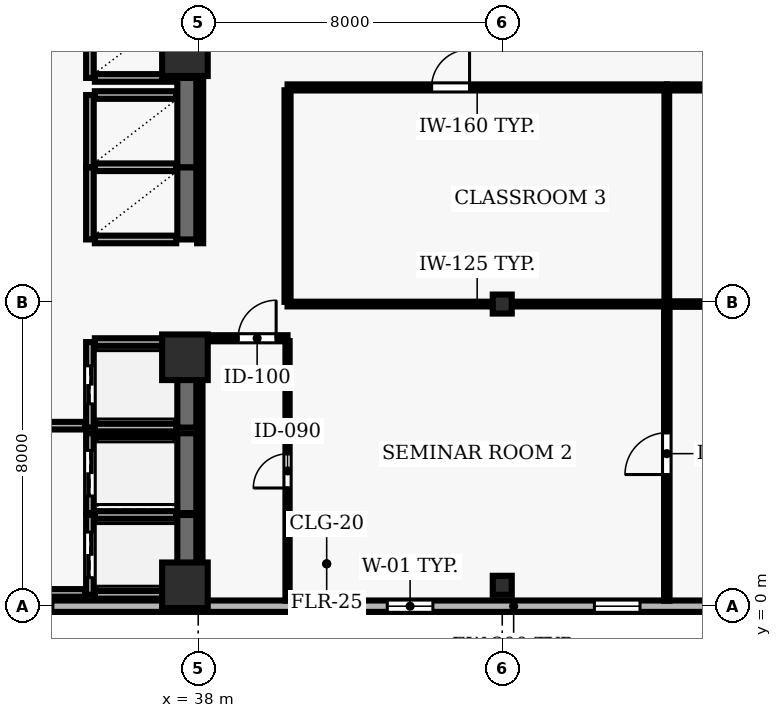
"""IFC4 building model, lengths in metres.
Left out: names, types, materials, properties, quantities, classifications, styles, units other than length and angle.
Written with IfcOpenShell. Run it as: python <this file> out.ifc"""

import sys

from ifc_helpers import new_model, si_unit, direction, frame, frame_2d, origin, origin_2d, place, context, subcontext, project, spatial, rectangle, hollow_rectangle, extrude, element, fill, save


model = new_model("IFC4")
c1 = context("Model", 3, precision=1e-05, world=origin(), true_north=direction((0.0, 1.0)))
c2 = subcontext(c1, "Body", "Model", "MODEL_VIEW")
j1 = project(units=[si_unit("LENGTHUNIT", "METRE"), si_unit("PLANEANGLEUNIT", "RADIAN")], contexts=[c1])
p1 = place(None, origin())
s1 = spatial("IfcSite", under=j1, at=p1, CompositionType="ELEMENT")
p2 = place(p1, origin())
s2 = spatial("IfcBuilding", under=s1, at=p2, CompositionType="ELEMENT")
p3 = place(p2, frame((0.0, 0.0, 103.4)))
s3 = spatial("IfcBuildingStorey", under=s2, at=p3, CompositionType="ELEMENT", Elevation=103.4)
for number, where, z_axis, x_axis in (
    (1, (37.65, 0.55, 0.0), (0.0, 0.0, 1.0), (1.0, 0.0, 0.0)),
    (2, (37.65, 6.55, 0.0), (0.0, 0.0, 1.0), (1.0, 0.0, 0.0)),
    (3, (37.65, 14.55, 0.0), (0.0, 0.0, 1.0), (1.0, 0.0, 0.0)),
):
    element("IfcColumn", number, at=place(p3, frame(where, z_axis=z_axis, x_axis=x_axis)), inside=s3, PredefinedType="COLUMN", context=c2, shape_type="SweptSolid", body=[
        extrude(rectangle(XDim=1.2, YDim=1.2, at=origin_2d()), origin(), (0.0, 0.0, 1.0), 3.9),
    ])
for number, where, z_axis, x_axis in (
    (4, (46.0, 0.55, 0.0), (0.0, 0.0, 1.0), (1.0, 0.0, 0.0)),
    (5, (46.0, 7.95, 0.0), (0.0, 0.0, 1.0), (1.0, 0.0, 0.0)),
):
    element("IfcColumn", number, at=place(p3, frame(where, z_axis=z_axis, x_axis=x_axis)), inside=s3, PredefinedType="COLUMN", context=c2, shape_type="SweptSolid", body=[
        extrude(hollow_rectangle(XDim=0.5, YDim=0.5, WallThickness=0.025, at=origin_2d()), origin(), (0.0, 0.0, 1.0), 3.9),
    ])
p4 = place(p3, frame((24.5, 0.0, 0.0), z_axis=(0.0, 0.0, 1.0), x_axis=(1.0, 0.0, 0.0)))
e6 = element("IfcWall", 6, at=p4, inside=s3, PredefinedType="SOLIDWALL", context=c2, shape_type="SweptSolid", body=[
    extrude(rectangle(XDim=43.6, YDim=0.3, at=frame_2d((21.8, 0.0))), origin(), (0.0, 0.0, 1.0), 3.69),
])
p5 = place(p4, frame((2.125, 0.0, 0.9)))
e7 = element("IfcOpeningElement", 7, at=p5, cuts=e6, PredefinedType="OPENING", context=c2, shape_type="SweptSolid", body=[
    extrude(rectangle(XDim=1.2, YDim=1.6, at=frame_2d((0.6, 0.8))), frame((0.0, 0.16, 0.0), z_axis=(0.0, -1.0, 0.0), x_axis=(1.0, 0.0, 0.0)), (0.0, 0.0, 1.0), 0.32),
])
p6 = place(p4, frame((8.475, 0.0, 0.9)))
e8 = element("IfcOpeningElement", 8, at=p6, cuts=e6, PredefinedType="OPENING", context=c2, shape_type="SweptSolid", body=[
    extrude(rectangle(XDim=1.2, YDim=1.6, at=frame_2d((0.6, 0.8))), frame((0.0, 0.16, 0.0), z_axis=(0.0, -1.0, 0.0), x_axis=(1.0, 0.0, 0.0)), (0.0, 0.0, 1.0), 0.32),
])
p7 = place(p4, frame((18.475, 0.0, 0.9)))
e9 = element("IfcOpeningElement", 9, at=p7, cuts=e6, PredefinedType="OPENING", context=c2, shape_type="SweptSolid", body=[
    extrude(rectangle(XDim=1.2, YDim=1.6, at=frame_2d((0.6, 0.8))), frame((0.0, 0.16, 0.0), z_axis=(0.0, -1.0, 0.0), x_axis=(1.0, 0.0, 0.0)), (0.0, 0.0, 1.0), 0.32),
])
p8 = place(p4, frame((23.925, 0.0, 0.9)))
e10 = element("IfcOpeningElement", 10, at=p8, cuts=e6, PredefinedType="OPENING", context=c2, shape_type="SweptSolid", body=[
    extrude(rectangle(XDim=1.2, YDim=1.6, at=frame_2d((0.6, 0.8))), frame((0.0, 0.16, 0.0), z_axis=(0.0, -1.0, 0.0), x_axis=(1.0, 0.0, 0.0)), (0.0, 0.0, 1.0), 0.32),
])
p9 = place(p4, frame((29.375, 0.0, 0.9)))
e11 = element("IfcOpeningElement", 11, at=p9, cuts=e6, PredefinedType="OPENING", context=c2, shape_type="SweptSolid", body=[
    extrude(rectangle(XDim=1.2, YDim=1.6, at=frame_2d((0.6, 0.8))), frame((0.0, 0.16, 0.0), z_axis=(0.0, -1.0, 0.0), x_axis=(1.0, 0.0, 0.0)), (0.0, 0.0, 1.0), 0.32),
])
p10 = place(p4, frame((33.925, 0.0, 0.9)))
e12 = element("IfcOpeningElement", 12, at=p10, cuts=e6, PredefinedType="OPENING", context=c2, shape_type="SweptSolid", body=[
    extrude(rectangle(XDim=1.2, YDim=1.6, at=frame_2d((0.6, 0.8))), frame((0.0, 0.16, 0.0), z_axis=(0.0, -1.0, 0.0), x_axis=(1.0, 0.0, 0.0)), (0.0, 0.0, 1.0), 0.32),
])
p11 = place(p4, frame((40.275, 0.0, 0.9)))
e13 = element("IfcOpeningElement", 13, at=p11, cuts=e6, PredefinedType="OPENING", context=c2, shape_type="SweptSolid", body=[
    extrude(rectangle(XDim=1.2, YDim=1.6, at=frame_2d((0.6, 0.8))), frame((0.0, 0.16, 0.0), z_axis=(0.0, -1.0, 0.0), x_axis=(1.0, 0.0, 0.0)), (0.0, 0.0, 1.0), 0.32),
])
p12 = place(p3, frame((35.15, 2.4, 0.0), z_axis=(0.0, 0.0, 1.0), x_axis=(0.0, -1.0, 0.0)))
e14 = element("IfcWall", 14, at=p12, inside=s3, PredefinedType="SOLIDWALL", context=c2, shape_type="SweptSolid", body=[
    extrude(rectangle(XDim=2.1, YDim=0.2, at=frame_2d((1.05, 0.0))), origin(), (0.0, 0.0, 1.0), 3.69),
])
p13 = place(p12, frame((0.45, 0.0, 0.0)))
e15 = element("IfcOpeningElement", 15, at=p13, cuts=e14, PredefinedType="OPENING", context=c2, shape_type="SweptSolid", body=[
    extrude(rectangle(XDim=1.2, YDim=2.15, at=frame_2d((0.6, 1.075))), frame((0.0, 0.11, 0.0), z_axis=(0.0, -1.0, 0.0), x_axis=(1.0, 0.0, 0.0)), (0.0, 0.0, 1.0), 0.22),
])
p14 = place(p3, frame((37.7, 0.3, 0.0), z_axis=(0.0, 0.0, 1.0), x_axis=(0.0, 1.0, 0.0)))
e16 = element("IfcWall", 16, at=p14, inside=s3, PredefinedType="SHEAR", context=c2, shape_type="SweptSolid", body=[
    extrude(rectangle(XDim=2.1, YDim=0.5, at=frame_2d((1.05, 0.0))), origin(), (0.0, 0.0, 1.0), 3.69),
])
for number, where, z_axis, x_axis in (
    (17, (35.28, 0.3, 0.0), (0.0, 0.0, 1.0), (1.0, 0.0, 0.0)),
    (18, (37.42, 2.4, 0.0), (0.0, 0.0, 1.0), (-1.0, 0.0, 0.0)),
):
    element("IfcWall", number, at=place(p3, frame(where, z_axis=z_axis, x_axis=x_axis)), inside=s3, PredefinedType="SOLIDWALL", context=c2, shape_type="SweptSolid", body=[
        extrude(rectangle(XDim=2.14, YDim=0.2, at=frame_2d((1.07, 0.0))), origin(), (0.0, 0.0, 1.0), 3.69),
    ])
p15 = place(p3, frame((35.15, 4.55, 0.0), z_axis=(0.0, 0.0, 1.0), x_axis=(0.0, -1.0, 0.0)))
e19 = element("IfcWall", 19, at=p15, inside=s3, PredefinedType="SOLIDWALL", context=c2, shape_type="SweptSolid", body=[
    extrude(rectangle(XDim=2.1, YDim=0.2, at=frame_2d((1.05, 0.0))), origin(), (0.0, 0.0, 1.0), 3.69),
])
p16 = place(p15, frame((0.45, 0.0, 0.0)))
e20 = element("IfcOpeningElement", 20, at=p16, cuts=e19, PredefinedType="OPENING", context=c2, shape_type="SweptSolid", body=[
    extrude(rectangle(XDim=1.2, YDim=2.15, at=frame_2d((0.6, 1.075))), frame((0.0, 0.11, 0.0), z_axis=(0.0, -1.0, 0.0), x_axis=(1.0, 0.0, 0.0)), (0.0, 0.0, 1.0), 0.22),
])
p17 = place(p3, frame((37.7, 2.45, 0.0), z_axis=(0.0, 0.0, 1.0), x_axis=(0.0, 1.0, 0.0)))
e21 = element("IfcWall", 21, at=p17, inside=s3, PredefinedType="SHEAR", context=c2, shape_type="SweptSolid", body=[
    extrude(rectangle(XDim=2.1, YDim=0.5, at=frame_2d((1.05, 0.0))), origin(), (0.0, 0.0, 1.0), 3.69),
])
p18 = place(p3, frame((37.42, 4.55, 0.0), z_axis=(0.0, 0.0, 1.0), x_axis=(-1.0, 0.0, 0.0)))
e22 = element("IfcWall", 22, at=p18, inside=s3, PredefinedType="SOLIDWALL", context=c2, shape_type="SweptSolid", body=[
    extrude(rectangle(XDim=2.14, YDim=0.2, at=frame_2d((1.07, 0.0))), origin(), (0.0, 0.0, 1.0), 3.69),
])
p19 = place(p3, frame((35.15, 6.95, 0.0), z_axis=(0.0, 0.0, 1.0), x_axis=(0.0, -1.0, 0.0)))
e23 = element("IfcWall", 23, at=p19, inside=s3, PredefinedType="SOLIDWALL", context=c2, shape_type="SweptSolid", body=[
    extrude(rectangle(XDim=2.25, YDim=0.2, at=frame_2d((1.125, 0.0))), origin(), (0.0, 0.0, 1.0), 3.69),
])
p20 = place(p19, frame((0.625, 0.0, 0.0)))
e24 = element("IfcOpeningElement", 24, at=p20, cuts=e23, PredefinedType="OPENING", context=c2, shape_type="SweptSolid", body=[
    extrude(rectangle(XDim=1.0, YDim=2.1, at=frame_2d((0.5, 1.05))), frame((0.0, 0.11, 0.0), z_axis=(0.0, -1.0, 0.0), x_axis=(1.0, 0.0, 0.0)), (0.0, 0.0, 1.0), 0.22),
])
p21 = place(p3, frame((37.7, 4.7, 0.0), z_axis=(0.0, 0.0, 1.0), x_axis=(0.0, 1.0, 0.0)))
e25 = element("IfcWall", 25, at=p21, inside=s3, PredefinedType="SHEAR", context=c2, shape_type="SweptSolid", body=[
    extrude(rectangle(XDim=2.25, YDim=0.5, at=frame_2d((1.125, 0.0))), origin(), (0.0, 0.0, 1.0), 3.69),
])
for number, where, z_axis, x_axis in (
    (26, (35.28, 4.7, 0.0), (0.0, 0.0, 1.0), (1.0, 0.0, 0.0)),
    (27, (37.42, 6.95, 0.0), (0.0, 0.0, 1.0), (-1.0, 0.0, 0.0)),
):
    element("IfcWall", number, at=place(p3, frame(where, z_axis=z_axis, x_axis=x_axis)), inside=s3, PredefinedType="SOLIDWALL", context=c2, shape_type="SweptSolid", body=[
        extrude(rectangle(XDim=2.14, YDim=0.2, at=frame_2d((1.07, 0.0))), origin(), (0.0, 0.0, 1.0), 3.69),
    ])
p22 = place(p3, frame((35.15, 11.55, 0.0), z_axis=(0.0, 0.0, 1.0), x_axis=(0.0, -1.0, 0.0)))
e28 = element("IfcWall", 28, at=p22, inside=s3, PredefinedType="SOLIDWALL", context=c2, shape_type="SweptSolid", body=[
    extrude(rectangle(XDim=1.9, YDim=0.2, at=frame_2d((0.95, 0.0))), origin(), (0.0, 0.0, 1.0), 3.69),
])
p23 = place(p3, frame((37.7, 9.65, 0.0), z_axis=(0.0, 0.0, 1.0), x_axis=(0.0, 1.0, 0.0)))
e29 = element("IfcWall", 29, at=p23, inside=s3, PredefinedType="SHEAR", context=c2, shape_type="SweptSolid", body=[
    extrude(rectangle(XDim=1.9, YDim=0.5, at=frame_2d((0.95, 0.0))), origin(), (0.0, 0.0, 1.0), 3.69),
])
for number, where, z_axis, x_axis in (
    (30, (35.28, 9.65, 0.0), (0.0, 0.0, 1.0), (1.0, 0.0, 0.0)),
    (31, (37.42, 11.55, 0.0), (0.0, 0.0, 1.0), (-1.0, 0.0, 0.0)),
):
    element("IfcWall", number, at=place(p3, frame(where, z_axis=z_axis, x_axis=x_axis)), inside=s3, PredefinedType="SOLIDWALL", context=c2, shape_type="SweptSolid", body=[
        extrude(rectangle(XDim=2.14, YDim=0.2, at=frame_2d((1.07, 0.0))), origin(), (0.0, 0.0, 1.0), 3.69),
    ])
p24 = place(p3, frame((35.15, 13.45, 0.0), z_axis=(0.0, 0.0, 1.0), x_axis=(0.0, -1.0, 0.0)))
e32 = element("IfcWall", 32, at=p24, inside=s3, PredefinedType="SOLIDWALL", context=c2, shape_type="SweptSolid", body=[
    extrude(rectangle(XDim=1.9, YDim=0.2, at=frame_2d((0.95, 0.0))), origin(), (0.0, 0.0, 1.0), 3.69),
])
p25 = place(p3, frame((37.7, 11.55, 0.0), z_axis=(0.0, 0.0, 1.0), x_axis=(0.0, 1.0, 0.0)))
e33 = element("IfcWall", 33, at=p25, inside=s3, PredefinedType="SHEAR", context=c2, shape_type="SweptSolid", body=[
    extrude(rectangle(XDim=2.35, YDim=0.5, at=frame_2d((1.175, 0.0))), origin(), (0.0, 0.0, 1.0), 3.69),
])
p26 = place(p3, frame((37.42, 13.45, 0.0), z_axis=(0.0, 0.0, 1.0), x_axis=(-1.0, 0.0, 0.0)))
e34 = element("IfcWall", 34, at=p26, inside=s3, PredefinedType="SOLIDWALL", context=c2, shape_type="SweptSolid", body=[
    extrude(rectangle(XDim=2.14, YDim=0.2, at=frame_2d((1.07, 0.0))), origin(), (0.0, 0.0, 1.0), 3.69),
])
p27 = place(p3, frame((35.15, 15.75, 0.0), z_axis=(0.0, 0.0, 1.0), x_axis=(0.0, -1.0, 0.0)))
e35 = element("IfcWall", 35, at=p27, inside=s3, PredefinedType="SOLIDWALL", context=c2, shape_type="SweptSolid", body=[
    extrude(rectangle(XDim=1.85, YDim=0.2, at=frame_2d((0.925, 0.0))), origin(), (0.0, 0.0, 1.0), 3.69),
])
p28 = place(p3, frame((37.7, 13.9, 0.0), z_axis=(0.0, 0.0, 1.0), x_axis=(0.0, 1.0, 0.0)))
e36 = element("IfcWall", 36, at=p28, inside=s3, PredefinedType="SHEAR", context=c2, shape_type="SweptSolid", body=[
    extrude(rectangle(XDim=1.85, YDim=0.5, at=frame_2d((0.925, 0.0))), origin(), (0.0, 0.0, 1.0), 3.69),
])
p29 = place(p3, frame((35.28, 13.9, 0.0), z_axis=(0.0, 0.0, 1.0), x_axis=(1.0, 0.0, 0.0)))
e37 = element("IfcWall", 37, at=p29, inside=s3, PredefinedType="SOLIDWALL", context=c2, shape_type="SweptSolid", body=[
    extrude(rectangle(XDim=2.14, YDim=0.2, at=frame_2d((1.07, 0.0))), origin(), (0.0, 0.0, 1.0), 3.69),
])
p30 = place(p3, frame((31.65, 0.35, 0.0), z_axis=(0.0, 0.0, 1.0), x_axis=(1.0, 0.0, 0.0)))
e38 = element("IfcWall", 38, at=p30, inside=s3, PredefinedType="SOLIDWALL", context=c2, shape_type="SweptSolid", body=[
    extrude(rectangle(XDim=3.37, YDim=0.2, at=frame_2d((1.685, 0.0))), origin(), (0.0, 0.0, 1.0), 3.69),
])
p31 = place(p3, frame((35.02, 4.75, 0.0), z_axis=(0.0, 0.0, 1.0), x_axis=(-1.0, 0.0, 0.0)))
e39 = element("IfcWall", 39, at=p31, inside=s3, PredefinedType="SOLIDWALL", context=c2, shape_type="SweptSolid", body=[
    extrude(rectangle(XDim=3.11, YDim=0.2, at=frame_2d((1.555, 0.0))), origin(), (0.0, 0.0, 1.0), 3.69),
])
p32 = place(p31, frame((1.03, 0.0, 0.0)))
e40 = element("IfcOpeningElement", 40, at=p32, cuts=e39, PredefinedType="OPENING", context=c2, shape_type="SweptSolid", body=[
    extrude(rectangle(XDim=1.05, YDim=2.15, at=frame_2d((0.525, 1.075))), frame((0.0, 0.11, 0.0), z_axis=(0.0, -1.0, 0.0), x_axis=(1.0, 0.0, 0.0)), (0.0, 0.0, 1.0), 0.22),
])
p33 = place(p3, frame((38.05, 7.05, 0.0), z_axis=(0.0, 0.0, 1.0), x_axis=(1.0, 0.0, 0.0)))
e41 = element("IfcWall", 41, at=p33, inside=s3, PredefinedType="PARTITIONING", context=c2, shape_type="SweptSolid", body=[
    extrude(rectangle(XDim=2.3, YDim=0.16, at=frame_2d((1.15, 0.0))), origin(), (0.0, 0.0, 1.0), 3.69),
])
p34 = place(p33, frame((1.0, 0.0, 0.0)))
e42 = element("IfcOpeningElement", 42, at=p34, cuts=e41, PredefinedType="OPENING", context=c2, shape_type="SweptSolid", body=[
    extrude(rectangle(XDim=1.0, YDim=2.1, at=frame_2d((0.5, 1.05))), frame((0.0, 0.09, 0.0), z_axis=(0.0, -1.0, 0.0), x_axis=(1.0, 0.0, 0.0)), (0.0, 0.0, 1.0), 0.18),
])
p35 = place(p3, frame((40.35, 13.65, 0.0), z_axis=(0.0, 0.0, 1.0), x_axis=(1.0, 0.0, 0.0)))
e43 = element("IfcWall", 43, at=p35, inside=s3, PredefinedType="PARTITIONING", context=c2, shape_type="SweptSolid", body=[
    extrude(rectangle(XDim=9.98, YDim=0.16, at=frame_2d((4.99, 0.0))), origin(), (0.0, 0.0, 1.0), 3.69),
])
p36 = place(p35, frame((3.79, 0.0, 0.0)))
e44 = element("IfcOpeningElement", 44, at=p36, cuts=e43, PredefinedType="OPENING", context=c2, shape_type="SweptSolid", body=[
    extrude(rectangle(XDim=1.0, YDim=2.1, at=frame_2d((0.5, 1.05))), frame((0.0, 0.09, 0.0), z_axis=(0.0, -1.0, 0.0), x_axis=(1.0, 0.0, 0.0)), (0.0, 0.0, 1.0), 0.18),
])
p37 = place(p3, frame((50.33, 7.95, 0.0), z_axis=(0.0, 0.0, 1.0), x_axis=(-1.0, 0.0, 0.0)))
e45 = element("IfcWall", 45, at=p37, inside=s3, PredefinedType="PARTITIONING", context=c2, shape_type="SweptSolid", body=[
    extrude(rectangle(XDim=9.98, YDim=0.125, at=frame_2d((4.99, 0.0))), origin(), (0.0, 0.0, 1.0), 3.074),
])
p38 = place(p3, frame((50.33, 13.65, 0.0), z_axis=(0.0, 0.0, 1.0), x_axis=(1.0, 0.0, 0.0)))
e46 = element("IfcWall", 46, at=p38, inside=s3, PredefinedType="PARTITIONING", context=c2, shape_type="SweptSolid", body=[
    extrude(rectangle(XDim=10.29, YDim=0.16, at=frame_2d((5.145, 0.0))), origin(), (0.0, 0.0, 1.0), 3.69),
])
p39 = place(p38, frame((4.695, 0.0, 0.0)))
e47 = element("IfcOpeningElement", 47, at=p39, cuts=e46, PredefinedType="OPENING", context=c2, shape_type="SweptSolid", body=[
    extrude(rectangle(XDim=0.9, YDim=2.1, at=frame_2d((0.45, 1.05))), frame((0.0, 0.09, 0.0), z_axis=(0.0, -1.0, 0.0), x_axis=(1.0, 0.0, 0.0)), (0.0, 0.0, 1.0), 0.18),
])
p40 = place(p3, frame((60.62, 7.95, 0.0), z_axis=(0.0, 0.0, 1.0), x_axis=(-1.0, 0.0, 0.0)))
e48 = element("IfcWall", 48, at=p40, inside=s3, PredefinedType="PARTITIONING", context=c2, shape_type="SweptSolid", body=[
    extrude(rectangle(XDim=10.29, YDim=0.145, at=frame_2d((5.145, 0.0))), origin(), (0.0, 0.0, 1.0), 3.074),
])
p41 = place(p3, frame((38.05, 6.975, 0.0), z_axis=(0.0, 0.0, 1.0), x_axis=(0.0, -1.0, 0.0)))
e49 = element("IfcWall", 49, at=p41, inside=s3, PredefinedType="PARTITIONING", context=c2, shape_type="SweptSolid", body=[
    extrude(rectangle(XDim=6.83, YDim=0.125, at=frame_2d((3.415, 0.0))), origin(), (0.0, 0.0, 1.0), 3.074),
])
p42 = place(p3, frame((38.05, 15.925, 0.0), z_axis=(0.0, 0.0, 1.0), x_axis=(0.0, -1.0, 0.0)))
e50 = element("IfcWall", 50, at=p42, inside=s3, PredefinedType="PARTITIONING", context=c2, shape_type="SweptSolid", body=[
    extrude(rectangle(XDim=6.375, YDim=0.16, at=frame_2d((3.188, 0.0))), origin(), (0.0, 0.0, 1.0), 3.074),
])
p43 = place(p3, frame((40.35, 0.145, 0.0), z_axis=(0.0, 0.0, 1.0), x_axis=(0.0, 1.0, 0.0)))
e51 = element("IfcWall", 51, at=p43, inside=s3, PredefinedType="MOVABLE", context=c2, shape_type="SweptSolid", body=[
    extrude(rectangle(XDim=6.83, YDim=0.11, at=frame_2d((3.415, 0.0))), origin(), (0.0, 0.0, 1.0), 3.69),
])
p44 = place(p43, frame((2.965, 0.0, 0.0)))
e52 = element("IfcOpeningElement", 52, at=p44, cuts=e51, PredefinedType="OPENING", context=c2, shape_type="SweptSolid", body=[
    extrude(rectangle(XDim=0.9, YDim=2.1, at=frame_2d((0.45, 1.05))), frame((0.0, 0.065, 0.0), z_axis=(0.0, -1.0, 0.0), x_axis=(1.0, 0.0, 0.0)), (0.0, 0.0, 1.0), 0.13),
])
p45 = place(p3, frame((40.35, 8.008, 0.0), z_axis=(0.0, 0.0, 1.0), x_axis=(0.0, 1.0, 0.0)))
e53 = element("IfcWall", 53, at=p45, inside=s3, PredefinedType="PARTITIONING", context=c2, shape_type="SweptSolid", body=[
    extrude(rectangle(XDim=5.567, YDim=0.16, at=frame_2d((2.783, 0.0))), origin(), (0.0, 0.0, 1.0), 3.69),
])
p46 = place(p3, frame((50.33, 0.145, 0.0), z_axis=(0.0, 0.0, 1.0), x_axis=(0.0, 1.0, 0.0)))
e54 = element("IfcWall", 54, at=p46, inside=s3, PredefinedType="PARTITIONING", context=c2, shape_type="SweptSolid", body=[
    extrude(rectangle(XDim=7.738, YDim=0.145, at=frame_2d((3.869, 0.0))), origin(), (0.0, 0.0, 1.0), 3.69),
])
p47 = place(p46, frame((3.319, 0.0, 0.0)))
e55 = element("IfcOpeningElement", 55, at=p47, cuts=e54, PredefinedType="OPENING", context=c2, shape_type="SweptSolid", body=[
    extrude(rectangle(XDim=1.1, YDim=2.15, at=frame_2d((0.55, 1.075))), frame((0.0, 0.083, 0.0), z_axis=(0.0, -1.0, 0.0), x_axis=(1.0, 0.0, 0.0)), (0.0, 0.0, 1.0), 0.165),
])
p48 = place(p3, frame((50.33, 8.018, 0.0), z_axis=(0.0, 0.0, 1.0), x_axis=(0.0, 1.0, 0.0)))
e56 = element("IfcWall", 56, at=p48, inside=s3, PredefinedType="PARTITIONING", context=c2, shape_type="SweptSolid", body=[
    extrude(rectangle(XDim=5.557, YDim=0.125, at=frame_2d((2.778, 0.0))), origin(), (0.0, 0.0, 1.0), 3.69),
])
p49 = place(p6, origin())
e57 = element("IfcWindow", 57, at=p49, inside=s3, PartitioningType="SINGLE_PANEL", PredefinedType="WINDOW", context=c2, shape_type="SweptSolid", body=[
    extrude(rectangle(XDim=1.2, YDim=1.6, at=frame_2d((0.6, 0.8))), frame((0.0, 0.03, 0.0), z_axis=(0.0, -1.0, 0.0), x_axis=(1.0, 0.0, 0.0)), (0.0, 0.0, 1.0), 0.06),
])
fill(e8, e57)
p50 = place(p7, origin())
e58 = element("IfcWindow", 58, at=p50, inside=s3, PartitioningType="SINGLE_PANEL", PredefinedType="WINDOW", context=c2, shape_type="SweptSolid", body=[
    extrude(rectangle(XDim=1.2, YDim=1.6, at=frame_2d((0.6, 0.8))), frame((0.0, 0.03, 0.0), z_axis=(0.0, -1.0, 0.0), x_axis=(1.0, 0.0, 0.0)), (0.0, 0.0, 1.0), 0.06),
])
fill(e9, e58)
p51 = place(p8, origin())
e59 = element("IfcWindow", 59, at=p51, inside=s3, PartitioningType="SINGLE_PANEL", PredefinedType="WINDOW", context=c2, shape_type="SweptSolid", body=[
    extrude(rectangle(XDim=1.2, YDim=1.6, at=frame_2d((0.6, 0.8))), frame((0.0, 0.03, 0.0), z_axis=(0.0, -1.0, 0.0), x_axis=(1.0, 0.0, 0.0)), (0.0, 0.0, 1.0), 0.06),
])
fill(e10, e59)
p52 = place(p13, origin())
e60 = element("IfcDoor", 60, at=p52, inside=s3, OperationType="DOUBLE_DOOR_SLIDING", PredefinedType="DOOR", context=c2, shape_type="SweptSolid", body=[
    extrude(rectangle(XDim=1.2, YDim=2.15, at=frame_2d((0.6, 1.075))), frame((0.0, 0.025, 0.0), z_axis=(0.0, -1.0, 0.0), x_axis=(1.0, 0.0, 0.0)), (0.0, 0.0, 1.0), 0.05),
])
fill(e15, e60)
p53 = place(p16, origin())
e61 = element("IfcDoor", 61, at=p53, inside=s3, OperationType="DOUBLE_DOOR_SLIDING", PredefinedType="DOOR", context=c2, shape_type="SweptSolid", body=[
    extrude(rectangle(XDim=1.2, YDim=2.15, at=frame_2d((0.6, 1.075))), frame((0.0, 0.025, 0.0), z_axis=(0.0, -1.0, 0.0), x_axis=(1.0, 0.0, 0.0)), (0.0, 0.0, 1.0), 0.05),
])
fill(e20, e61)
p54 = place(p20, origin())
e62 = element("IfcDoor", 62, at=p54, inside=s3, OperationType="DOUBLE_DOOR_SLIDING", PredefinedType="DOOR", context=c2, shape_type="SweptSolid", body=[
    extrude(rectangle(XDim=1.0, YDim=2.1, at=frame_2d((0.5, 1.05))), frame((0.0, 0.025, 0.0), z_axis=(0.0, -1.0, 0.0), x_axis=(1.0, 0.0, 0.0)), (0.0, 0.0, 1.0), 0.05),
])
fill(e24, e62)
p55 = place(p34, origin())
e63 = element("IfcDoor", 63, at=p55, inside=s3, OperationType="SINGLE_SWING_RIGHT", PredefinedType="DOOR", context=c2, shape_type="SweptSolid", body=[
    extrude(rectangle(XDim=1.0, YDim=2.1, at=frame_2d((0.5, 1.05))), frame((0.0, 0.025, 0.0), z_axis=(0.0, -1.0, 0.0), x_axis=(1.0, 0.0, 0.0)), (0.0, 0.0, 1.0), 0.05),
])
fill(e42, e63)
p56 = place(p44, origin())
e64 = element("IfcDoor", 64, at=p56, inside=s3, OperationType="SINGLE_SWING_LEFT", PredefinedType="DOOR", context=c2, shape_type="SweptSolid", body=[
    extrude(rectangle(XDim=0.9, YDim=2.1, at=frame_2d((0.45, 1.05))), frame((0.0, 0.025, 0.0), z_axis=(0.0, -1.0, 0.0), x_axis=(1.0, 0.0, 0.0)), (0.0, 0.0, 1.0), 0.05),
])
fill(e52, e64)
p57 = place(p36, origin())
e65 = element("IfcDoor", 65, at=p57, inside=s3, OperationType="SINGLE_SWING_RIGHT", PredefinedType="DOOR", context=c2, shape_type="SweptSolid", body=[
    extrude(rectangle(XDim=1.0, YDim=2.1, at=frame_2d((0.5, 1.05))), frame((0.0, 0.025, 0.0), z_axis=(0.0, -1.0, 0.0), x_axis=(1.0, 0.0, 0.0)), (0.0, 0.0, 1.0), 0.05),
])
fill(e44, e65)
p58 = place(p47, origin())
e66 = element("IfcDoor", 66, at=p58, inside=s3, OperationType="SINGLE_SWING_LEFT", PredefinedType="DOOR", context=c2, shape_type="SweptSolid", body=[
    extrude(rectangle(XDim=1.1, YDim=2.15, at=frame_2d((0.55, 1.075))), frame((0.0, 0.025, 0.0), z_axis=(0.0, -1.0, 0.0), x_axis=(1.0, 0.0, 0.0)), (0.0, 0.0, 1.0), 0.05),
])
fill(e55, e66)
save(model, sys.argv[1])
